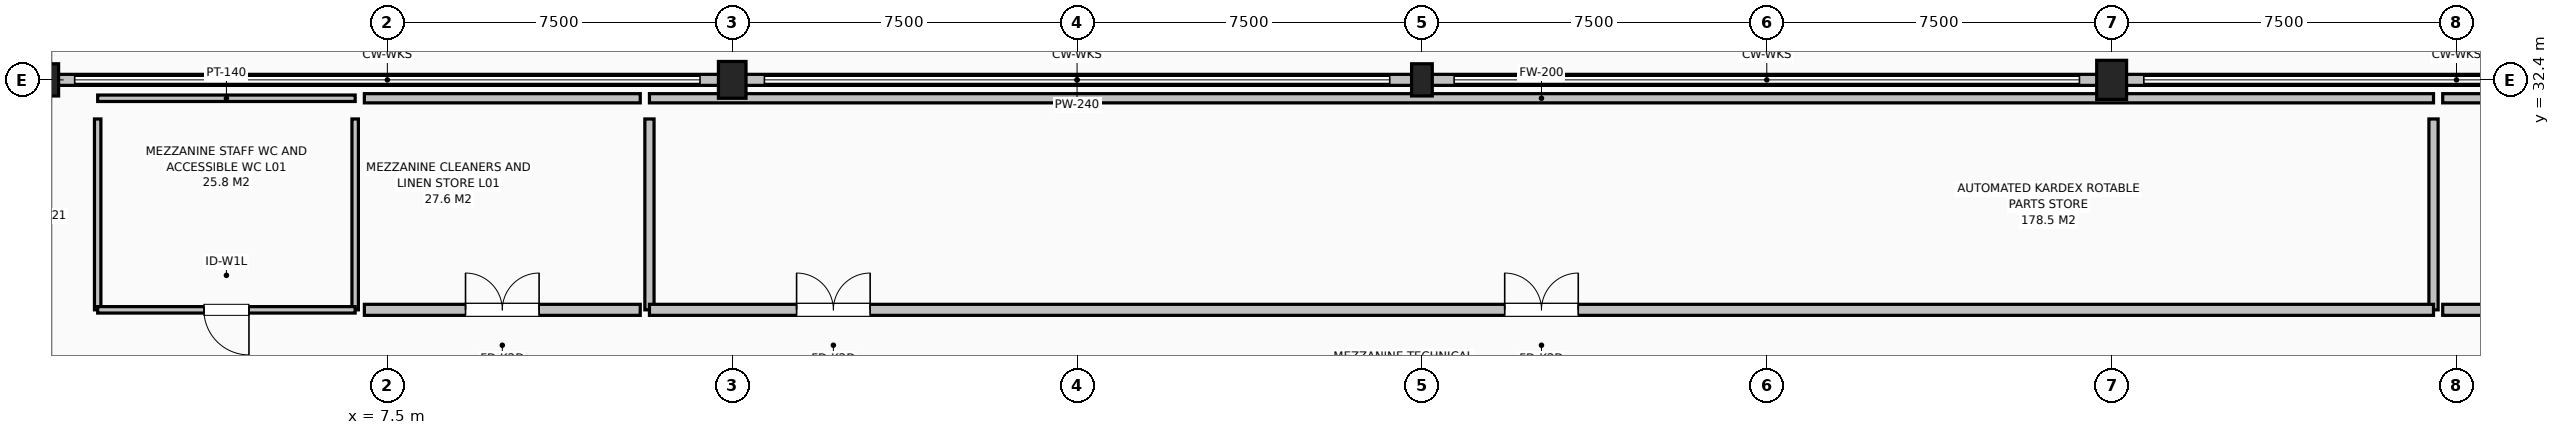
"""IFC4 building model, lengths in metres.
Left out: names, types, materials, properties, quantities, classifications, styles, units other than length and angle.
Written with IfcOpenShell. Run it as: python <this file> out.ifc"""

import sys

from ifc_helpers import new_model, si_unit, direction, frame, frame_2d, origin, origin_2d, place, context, subcontext, project, spatial, rectangle, extrude, element, fill, save


model = new_model("IFC4")
c1 = context("Model", 3, precision=1e-05, world=origin(), true_north=direction((0.0, 1.0)))
c2 = subcontext(c1, "Body", "Model", "MODEL_VIEW")
j1 = project(units=[si_unit("LENGTHUNIT", "METRE"), si_unit("PLANEANGLEUNIT", "RADIAN")], contexts=[c1])
p1 = place(None, origin())
s1 = spatial("IfcSite", under=j1, at=p1, CompositionType="ELEMENT")
p2 = place(p1, origin())
s2 = spatial("IfcBuilding", under=s1, at=p2, CompositionType="ELEMENT")
p3 = place(p2, frame((0.0, 0.0, 4.8)))
s3 = spatial("IfcBuildingStorey", under=s2, at=p3, CompositionType="ELEMENT", Elevation=4.8)
p4 = place(p3, frame((0.0, 32.4, 0.0), z_axis=(0.0, 0.0, 1.0), x_axis=(1.0, 0.0, 0.0)))
e1 = element("IfcColumn", 1, at=p4, inside=s3, PredefinedType="COLUMN", context=c2, shape_type="SweptSolid", body=[
    extrude(rectangle(XDim=0.7, YDim=0.7, at=origin_2d()), origin(), (0.0, 0.0, 1.0), 4.2),
])
p5 = place(p3, frame((15.0, 32.4, 0.0), z_axis=(0.0, 0.0, 1.0), x_axis=(1.0, 0.0, 0.0)))
e2 = element("IfcColumn", 2, at=p5, inside=s3, PredefinedType="COLUMN", context=c2, shape_type="SweptSolid", body=[
    extrude(rectangle(XDim=0.6, YDim=0.8, at=origin_2d()), origin(), (0.0, 0.0, 1.0), 4.2),
])
p6 = place(p3, frame((30.0, 32.4, 0.0), z_axis=(0.0, 0.0, 1.0), x_axis=(1.0, 0.0, 0.0)))
e3 = element("IfcColumn", 3, at=p6, inside=s3, PredefinedType="COLUMN", context=c2, shape_type="SweptSolid", body=[
    extrude(rectangle(XDim=0.45, YDim=0.7, at=origin_2d()), origin(), (0.0, 0.0, 1.0), 4.2),
])
p7 = place(p3, frame((45.0, 32.4, 0.0), z_axis=(0.0, 0.0, 1.0), x_axis=(1.0, 0.0, 0.0)))
e4 = element("IfcColumn", 4, at=p7, inside=s3, PredefinedType="COLUMN", context=c2, shape_type="SweptSolid", body=[
    extrude(rectangle(XDim=0.65, YDim=0.85, at=origin_2d()), origin(), (0.0, 0.0, 1.0), 4.2),
])
p8 = place(p3, frame((0.0, 32.4, 0.0), z_axis=(0.0, 0.0, 1.0), x_axis=(1.0, 0.0, 0.0)))
e5 = element("IfcWall", 5, at=p8, inside=s3, PredefinedType="PARAPET", context=c2, shape_type="SweptSolid", body=[
    extrude(rectangle(XDim=45.0, YDim=0.24, at=frame_2d((22.5, 0.0))), origin(), (0.0, 0.0, 1.0), 1.15),
])
p9 = place(p3, frame((45.0, 32.4, 0.0), z_axis=(0.0, 0.0, 1.0), x_axis=(1.0, 0.0, 0.0)))
e6 = element("IfcWall", 6, at=p9, inside=s3, PredefinedType="PARAPET", context=c2, shape_type="SweptSolid", body=[
    extrude(rectangle(XDim=48.6, YDim=0.24, at=frame_2d((24.3, 0.0))), origin(), (0.0, 0.0, 1.0), 1.15),
])
p10 = place(p3, frame((13.2, 32.0, 0.0), z_axis=(0.0, 0.0, 1.0), x_axis=(1.0, 0.0, 0.0)))
e7 = element("IfcWall", 7, at=p10, inside=s3, PredefinedType="SOLIDWALL", context=c2, shape_type="SweptSolid", body=[
    extrude(rectangle(XDim=38.8, YDim=0.2, at=frame_2d((19.4, 0.0))), origin(), (0.0, 0.0, 1.0), 3.082),
])
for number, where, z_axis, x_axis in (
    (8, (52.0, 27.4, 0.0), (0.0, 0.0, 1.0), (0.0, 1.0, 0.0)),
    (9, (13.2, 31.55, 0.0), (0.0, 0.0, 1.0), (0.0, -1.0, 0.0)),
):
    element("IfcWall", number, at=place(p3, frame(where, z_axis=z_axis, x_axis=x_axis)), inside=s3, PredefinedType="SOLIDWALL", context=c2, shape_type="SweptSolid", body=[
        extrude(rectangle(XDim=4.15, YDim=0.2, at=frame_2d((2.075, 0.0))), origin(), (0.0, 0.0, 1.0), 3.6),
    ])
p11 = place(p3, frame((52.0, 27.4, 0.0), z_axis=(0.0, 0.0, 1.0), x_axis=(-1.0, 0.0, 0.0)))
e10 = element("IfcWall", 10, at=p11, inside=s3, PredefinedType="SOLIDWALL", context=c2, shape_type="SweptSolid", body=[
    extrude(rectangle(XDim=38.8, YDim=0.24, at=frame_2d((19.4, 0.0))), origin(), (0.0, 0.0, 1.0), 3.082),
])
p12 = place(p11, frame((18.6, 0.0, 0.0)))
e11 = element("IfcOpeningElement", 11, at=p12, cuts=e10, PredefinedType="OPENING", context=c2, shape_type="SweptSolid", body=[
    extrude(rectangle(XDim=1.6, YDim=2.15, at=frame_2d((0.8, 1.075))), frame((0.0, 0.13, 0.0), z_axis=(0.0, -1.0, 0.0), x_axis=(1.0, 0.0, 0.0)), (0.0, 0.0, 1.0), 0.26),
])
p13 = place(p11, frame((34.0, 0.0, 0.0)))
e12 = element("IfcOpeningElement", 12, at=p13, cuts=e10, PredefinedType="OPENING", context=c2, shape_type="SweptSolid", body=[
    extrude(rectangle(XDim=1.6, YDim=2.15, at=frame_2d((0.8, 1.075))), frame((0.0, 0.13, 0.0), z_axis=(0.0, -1.0, 0.0), x_axis=(1.0, 0.0, 0.0)), (0.0, 0.0, 1.0), 0.26),
])
p14 = place(p3, frame((52.2, 32.0, 0.0), z_axis=(0.0, 0.0, 1.0), x_axis=(1.0, 0.0, 0.0)))
e13 = element("IfcWall", 13, at=p14, inside=s3, PredefinedType="SOLIDWALL", context=c2, shape_type="SweptSolid", body=[
    extrude(rectangle(XDim=31.0, YDim=0.2, at=frame_2d((15.5, 0.0))), origin(), (0.0, 0.0, 1.0), 3.082),
])
p15 = place(p3, frame((83.2, 27.4, 0.0), z_axis=(0.0, 0.0, 1.0), x_axis=(-1.0, 0.0, 0.0)))
e14 = element("IfcWall", 14, at=p15, inside=s3, PredefinedType="SOLIDWALL", context=c2, shape_type="SweptSolid", body=[
    extrude(rectangle(XDim=31.0, YDim=0.24, at=frame_2d((15.5, 0.0))), origin(), (0.0, 0.0, 1.0), 3.082),
])
p16 = place(p15, frame((14.7, 0.0, 0.0)))
e15 = element("IfcOpeningElement", 15, at=p16, cuts=e14, PredefinedType="OPENING", context=c2, shape_type="SweptSolid", body=[
    extrude(rectangle(XDim=1.6, YDim=2.15, at=frame_2d((0.8, 1.075))), frame((0.0, 0.13, 0.0), z_axis=(0.0, -1.0, 0.0), x_axis=(1.0, 0.0, 0.0)), (0.0, 0.0, 1.0), 0.26),
])
p17 = place(p15, frame((26.2, 0.0, 0.0)))
e16 = element("IfcOpeningElement", 16, at=p17, cuts=e14, PredefinedType="OPENING", context=c2, shape_type="SweptSolid", body=[
    extrude(rectangle(XDim=1.6, YDim=2.15, at=frame_2d((0.8, 1.075))), frame((0.0, 0.13, 0.0), z_axis=(0.0, -1.0, 0.0), x_axis=(1.0, 0.0, 0.0)), (0.0, 0.0, 1.0), 0.26),
])
p18 = place(p3, frame((1.2, 32.0, 0.0), z_axis=(0.0, 0.0, 1.0), x_axis=(1.0, 0.0, 0.0)))
e17 = element("IfcWall", 17, at=p18, inside=s3, PredefinedType="PARTITIONING", context=c2, shape_type="SweptSolid", body=[
    extrude(rectangle(XDim=5.6, YDim=0.14, at=frame_2d((2.8, 0.0))), origin(), (0.0, 0.0, 1.0), 3.5),
])
for number, where, z_axis, x_axis in (
    (18, (6.8, 27.4, 0.0), (0.0, 0.0, 1.0), (0.0, 1.0, 0.0)),
    (19, (1.2, 31.55, 0.0), (0.0, 0.0, 1.0), (0.0, -1.0, 0.0)),
):
    element("IfcWall", number, at=place(p3, frame(where, z_axis=z_axis, x_axis=x_axis)), inside=s3, PredefinedType="PARTITIONING", context=c2, shape_type="SweptSolid", body=[
        extrude(rectangle(XDim=4.15, YDim=0.14, at=frame_2d((2.075, 0.0))), origin(), (0.0, 0.0, 1.0), 3.5),
    ])
p19 = place(p3, frame((6.8, 27.4, 0.0), z_axis=(0.0, 0.0, 1.0), x_axis=(-1.0, 0.0, 0.0)))
e20 = element("IfcWall", 20, at=p19, inside=s3, PredefinedType="PARTITIONING", context=c2, shape_type="SweptSolid", body=[
    extrude(rectangle(XDim=5.6, YDim=0.14, at=frame_2d((2.8, 0.0))), origin(), (0.0, 0.0, 1.0), 3.5),
])
p20 = place(p19, frame((2.31, 0.0, 0.0)))
e21 = element("IfcOpeningElement", 21, at=p20, cuts=e20, PredefinedType="OPENING", context=c2, shape_type="SweptSolid", body=[
    extrude(rectangle(XDim=0.98, YDim=2.15, at=frame_2d((0.49, 1.075))), frame((0.0, 0.08, 0.0), z_axis=(0.0, -1.0, 0.0), x_axis=(1.0, 0.0, 0.0)), (0.0, 0.0, 1.0), 0.16),
])
p21 = place(p3, frame((7.0, 32.0, 0.0), z_axis=(0.0, 0.0, 1.0), x_axis=(1.0, 0.0, 0.0)))
e22 = element("IfcWall", 22, at=p21, inside=s3, PredefinedType="SOLIDWALL", context=c2, shape_type="SweptSolid", body=[
    extrude(rectangle(XDim=6.0, YDim=0.2, at=frame_2d((3.0, 0.0))), origin(), (0.0, 0.0, 1.0), 3.5),
])
p22 = place(p3, frame((13.0, 27.4, 0.0), z_axis=(0.0, 0.0, 1.0), x_axis=(-1.0, 0.0, 0.0)))
e23 = element("IfcWall", 23, at=p22, inside=s3, PredefinedType="SOLIDWALL", context=c2, shape_type="SweptSolid", body=[
    extrude(rectangle(XDim=6.0, YDim=0.24, at=frame_2d((3.0, 0.0))), origin(), (0.0, 0.0, 1.0), 3.5),
])
p23 = place(p22, frame((2.2, 0.0, 0.0)))
e24 = element("IfcOpeningElement", 24, at=p23, cuts=e23, PredefinedType="OPENING", context=c2, shape_type="SweptSolid", body=[
    extrude(rectangle(XDim=1.6, YDim=2.15, at=frame_2d((0.8, 1.075))), frame((0.0, 0.13, 0.0), z_axis=(0.0, -1.0, 0.0), x_axis=(1.0, 0.0, 0.0)), (0.0, 0.0, 1.0), 0.26),
])
p24 = place(p12, origin())
e25 = element("IfcDoor", 25, at=p24, inside=s3, OperationType="DOUBLE_SWING_RIGHT", PredefinedType="DOOR", context=c2, shape_type="SweptSolid", body=[
    extrude(rectangle(XDim=1.6, YDim=2.15, at=frame_2d((0.8, 1.075))), frame((0.0, 0.025, 0.0), z_axis=(0.0, -1.0, 0.0), x_axis=(1.0, 0.0, 0.0)), (0.0, 0.0, 1.0), 0.05),
])
fill(e11, e25)
p25 = place(p13, origin())
e26 = element("IfcDoor", 26, at=p25, inside=s3, OperationType="DOUBLE_SWING_RIGHT", PredefinedType="DOOR", context=c2, shape_type="SweptSolid", body=[
    extrude(rectangle(XDim=1.6, YDim=2.15, at=frame_2d((0.8, 1.075))), frame((0.0, 0.025, 0.0), z_axis=(0.0, -1.0, 0.0), x_axis=(1.0, 0.0, 0.0)), (0.0, 0.0, 1.0), 0.05),
])
fill(e12, e26)
p26 = place(p20, origin())
e27 = element("IfcDoor", 27, at=p26, inside=s3, OperationType="SINGLE_SWING_LEFT", PredefinedType="DOOR", context=c2, shape_type="SweptSolid", body=[
    extrude(rectangle(XDim=0.98, YDim=2.15, at=frame_2d((0.49, 1.075))), frame((0.0, 0.025, 0.0), z_axis=(0.0, -1.0, 0.0), x_axis=(1.0, 0.0, 0.0)), (0.0, 0.0, 1.0), 0.05),
])
fill(e21, e27)
p27 = place(p23, origin())
e28 = element("IfcDoor", 28, at=p27, inside=s3, OperationType="DOUBLE_SWING_RIGHT", PredefinedType="DOOR", context=c2, shape_type="SweptSolid", body=[
    extrude(rectangle(XDim=1.6, YDim=2.15, at=frame_2d((0.8, 1.075))), frame((0.0, 0.025, 0.0), z_axis=(0.0, -1.0, 0.0), x_axis=(1.0, 0.0, 0.0)), (0.0, 0.0, 1.0), 0.05),
])
fill(e24, e28)
save(model, sys.argv[1])
